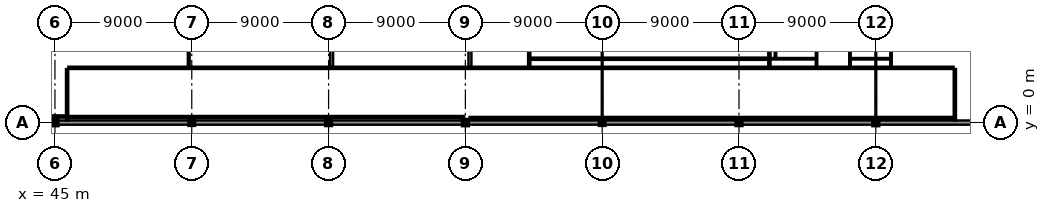
"""IFC4 building model, lengths in metres.
Left out: names, types, materials, properties, quantities, classifications, styles, units other than length and angle.
Written with IfcOpenShell. Run it as: python <this file> out.ifc"""

import sys

from ifc_helpers import new_model, si_unit, direction, frame, frame_2d, origin, origin_2d, place, context, subcontext, project, spatial, rectangle, i_section, extrude, element, fill, save


model = new_model("IFC4")
c1 = context("Model", 3, precision=1e-05, world=origin(), true_north=direction((0.0, 1.0)))
c2 = subcontext(c1, "Body", "Model", "MODEL_VIEW")
j1 = project(units=[si_unit("LENGTHUNIT", "METRE"), si_unit("PLANEANGLEUNIT", "RADIAN")], contexts=[c1])
p1 = place(None, origin())
s1 = spatial("IfcSite", under=j1, at=p1, CompositionType="ELEMENT")
p2 = place(p1, origin())
s2 = spatial("IfcBuilding", under=s1, at=p2, CompositionType="ELEMENT")
p3 = place(p2, frame((0.0, 0.0, 27.4)))
s3 = spatial("IfcBuildingStorey", under=s2, at=p3, CompositionType="ELEMENT", Elevation=27.4)
p4 = place(p3, frame((45.0, 0.0, 0.0), z_axis=(0.0, 0.0, 1.0), x_axis=(0.0, 1.0, 0.0)))
e1 = element("IfcColumn", 1, at=p4, inside=s3, PredefinedType="COLUMN", context=c2, shape_type="SweptSolid", body=[
    extrude(i_section(OverallWidth=0.3, OverallDepth=0.32, WebThickness=0.011, FlangeThickness=0.021, at=origin_2d()), origin(), (0.0, 0.0, 1.0), 4.0),
])
p5 = place(p3, frame((54.0, 0.0, 0.0), z_axis=(0.0, 0.0, 1.0), x_axis=(1.0, 0.0, 0.0)))
e2 = element("IfcColumn", 2, at=p5, inside=s3, PredefinedType="COLUMN", context=c2, shape_type="SweptSolid", body=[
    extrude(i_section(OverallWidth=0.28, OverallDepth=0.28, WebThickness=0.01, FlangeThickness=0.018, at=origin_2d()), origin(), (0.0, 0.0, 1.0), 4.0),
])
p6 = place(p3, frame((63.0, 0.0, 0.0), z_axis=(0.0, 0.0, 1.0), x_axis=(1.0, 0.0, 0.0)))
e3 = element("IfcColumn", 3, at=p6, inside=s3, PredefinedType="COLUMN", context=c2, shape_type="SweptSolid", body=[
    extrude(i_section(OverallWidth=0.3, OverallDepth=0.3, WebThickness=0.011, FlangeThickness=0.019, at=origin_2d()), origin(), (0.0, 0.0, 1.0), 4.0),
])
p7 = place(p3, frame((72.0, 0.0, 0.0), z_axis=(0.0, 0.0, 1.0), x_axis=(1.0, 0.0, 0.0)))
e4 = element("IfcColumn", 4, at=p7, inside=s3, PredefinedType="COLUMN", context=c2, shape_type="SweptSolid", body=[
    extrude(i_section(OverallWidth=0.3, OverallDepth=0.32, WebThickness=0.011, FlangeThickness=0.021, at=origin_2d()), origin(), (0.0, 0.0, 1.0), 4.0),
])
p8 = place(p3, frame((81.0, 0.0, 0.0), z_axis=(0.0, 0.0, 1.0), x_axis=(1.0, 0.0, 0.0)))
e5 = element("IfcColumn", 5, at=p8, inside=s3, PredefinedType="COLUMN", context=c2, shape_type="SweptSolid", body=[
    extrude(i_section(OverallWidth=0.28, OverallDepth=0.28, WebThickness=0.01, FlangeThickness=0.018, at=origin_2d()), origin(), (0.0, 0.0, 1.0), 4.0),
])
p9 = place(p3, frame((90.0, 0.0, 0.0), z_axis=(0.0, 0.0, 1.0), x_axis=(0.0, 1.0, 0.0)))
e6 = element("IfcColumn", 6, at=p9, inside=s3, PredefinedType="COLUMN", context=c2, shape_type="SweptSolid", body=[
    extrude(i_section(OverallWidth=0.3, OverallDepth=0.3, WebThickness=0.011, FlangeThickness=0.019, at=origin_2d()), origin(), (0.0, 0.0, 1.0), 4.0),
])
p10 = place(p3, frame((99.0, 0.0, 0.0), z_axis=(0.0, 0.0, 1.0), x_axis=(1.0, 0.0, 0.0)))
e7 = element("IfcColumn", 7, at=p10, inside=s3, PredefinedType="COLUMN", context=c2, shape_type="SweptSolid", body=[
    extrude(i_section(OverallWidth=0.3, OverallDepth=0.32, WebThickness=0.011, FlangeThickness=0.021, at=origin_2d()), origin(), (0.0, 0.0, 1.0), 4.0),
])
p11 = place(p3, frame((35.99, 0.0, 0.0), z_axis=(0.0, 0.0, 1.0), x_axis=(1.0, 0.0, 0.0)))
e8 = element("IfcWall", 8, at=p11, inside=s3, PredefinedType="SOLIDWALL", context=c2, shape_type="SweptSolid", body=[
    extrude(rectangle(XDim=8.852, YDim=0.28, at=frame_2d((4.426, 0.0))), origin(), (0.0, 0.0, 1.0), 2.787),
])
p12 = place(p3, frame((45.158, 0.0, 0.0), z_axis=(0.0, 0.0, 1.0), x_axis=(1.0, 0.0, 0.0)))
e9 = element("IfcWall", 9, at=p12, inside=s3, PredefinedType="SOLIDWALL", context=c2, shape_type="SweptSolid", body=[
    extrude(rectangle(XDim=8.834, YDim=0.28, at=frame_2d((4.417, 0.0))), origin(), (0.0, 0.0, 1.0), 2.787),
])
p13 = place(p12, frame((2.0, 0.0, 1.05)))
e10 = element("IfcOpeningElement", 10, at=p13, cuts=e9, PredefinedType="OPENING", context=c2, shape_type="SweptSolid", body=[
    extrude(rectangle(XDim=1.3, YDim=1.3, at=frame_2d((0.65, 0.65))), frame((0.0, 0.155, 0.0), z_axis=(0.0, -1.0, 0.0), x_axis=(1.0, 0.0, 0.0)), (0.0, 0.0, 1.0), 0.31),
])
p14 = place(p12, frame((5.534, 0.0, 1.05)))
e11 = element("IfcOpeningElement", 11, at=p14, cuts=e9, PredefinedType="OPENING", context=c2, shape_type="SweptSolid", body=[
    extrude(rectangle(XDim=1.3, YDim=1.3, at=frame_2d((0.65, 0.65))), frame((0.0, 0.155, 0.0), z_axis=(0.0, -1.0, 0.0), x_axis=(1.0, 0.0, 0.0)), (0.0, 0.0, 1.0), 0.31),
])
p15 = place(p3, frame((54.008, 0.0, 0.0), z_axis=(0.0, 0.0, 1.0), x_axis=(1.0, 0.0, 0.0)))
e12 = element("IfcWall", 12, at=p15, inside=s3, PredefinedType="SOLIDWALL", context=c2, shape_type="SweptSolid", body=[
    extrude(rectangle(XDim=8.984, YDim=0.28, at=frame_2d((4.492, 0.0))), origin(), (0.0, 0.0, 1.0), 2.787),
])
p16 = place(p15, frame((2.045, 0.0, 1.05)))
e13 = element("IfcOpeningElement", 13, at=p16, cuts=e12, PredefinedType="OPENING", context=c2, shape_type="SweptSolid", body=[
    extrude(rectangle(XDim=1.3, YDim=1.3, at=frame_2d((0.65, 0.65))), frame((0.0, 0.155, 0.0), z_axis=(0.0, -1.0, 0.0), x_axis=(1.0, 0.0, 0.0)), (0.0, 0.0, 1.0), 0.31),
])
p17 = place(p15, frame((5.639, 0.0, 1.05)))
e14 = element("IfcOpeningElement", 14, at=p17, cuts=e12, PredefinedType="OPENING", context=c2, shape_type="SweptSolid", body=[
    extrude(rectangle(XDim=1.3, YDim=1.3, at=frame_2d((0.65, 0.65))), frame((0.0, 0.155, 0.0), z_axis=(0.0, -1.0, 0.0), x_axis=(1.0, 0.0, 0.0)), (0.0, 0.0, 1.0), 0.31),
])
p18 = place(p3, frame((63.008, 0.0, 0.0), z_axis=(0.0, 0.0, 1.0), x_axis=(1.0, 0.0, 0.0)))
e15 = element("IfcWall", 15, at=p18, inside=s3, PredefinedType="SOLIDWALL", context=c2, shape_type="SweptSolid", body=[
    extrude(rectangle(XDim=8.984, YDim=0.28, at=frame_2d((4.492, 0.0))), origin(), (0.0, 0.0, 1.0), 2.787),
])
p19 = place(p18, frame((2.045, 0.0, 1.05)))
e16 = element("IfcOpeningElement", 16, at=p19, cuts=e15, PredefinedType="OPENING", context=c2, shape_type="SweptSolid", body=[
    extrude(rectangle(XDim=1.3, YDim=1.3, at=frame_2d((0.65, 0.65))), frame((0.0, 0.155, 0.0), z_axis=(0.0, -1.0, 0.0), x_axis=(1.0, 0.0, 0.0)), (0.0, 0.0, 1.0), 0.31),
])
p20 = place(p18, frame((5.639, 0.0, 1.05)))
e17 = element("IfcOpeningElement", 17, at=p20, cuts=e15, PredefinedType="OPENING", context=c2, shape_type="SweptSolid", body=[
    extrude(rectangle(XDim=1.3, YDim=1.3, at=frame_2d((0.65, 0.65))), frame((0.0, 0.155, 0.0), z_axis=(0.0, -1.0, 0.0), x_axis=(1.0, 0.0, 0.0)), (0.0, 0.0, 1.0), 0.31),
])
p21 = place(p3, frame((72.008, 0.0, 0.0), z_axis=(0.0, 0.0, 1.0), x_axis=(1.0, 0.0, 0.0)))
e18 = element("IfcWall", 18, at=p21, inside=s3, PredefinedType="SOLIDWALL", context=c2, shape_type="SweptSolid", body=[
    extrude(rectangle(XDim=8.934, YDim=0.28, at=frame_2d((4.467, 0.0))), origin(), (0.0, 0.0, 1.0), 2.885),
])
p22 = place(p21, frame((2.03, 0.0, 1.05)))
e19 = element("IfcOpeningElement", 19, at=p22, cuts=e18, PredefinedType="OPENING", context=c2, shape_type="SweptSolid", body=[
    extrude(rectangle(XDim=1.3, YDim=1.3, at=frame_2d((0.65, 0.65))), frame((0.0, 0.155, 0.0), z_axis=(0.0, -1.0, 0.0), x_axis=(1.0, 0.0, 0.0)), (0.0, 0.0, 1.0), 0.31),
])
p23 = place(p21, frame((5.604, 0.0, 1.05)))
e20 = element("IfcOpeningElement", 20, at=p23, cuts=e18, PredefinedType="OPENING", context=c2, shape_type="SweptSolid", body=[
    extrude(rectangle(XDim=1.3, YDim=1.3, at=frame_2d((0.65, 0.65))), frame((0.0, 0.155, 0.0), z_axis=(0.0, -1.0, 0.0), x_axis=(1.0, 0.0, 0.0)), (0.0, 0.0, 1.0), 0.31),
])
p24 = place(p3, frame((81.058, 0.0, 0.0), z_axis=(0.0, 0.0, 1.0), x_axis=(1.0, 0.0, 0.0)))
e21 = element("IfcWall", 21, at=p24, inside=s3, PredefinedType="SOLIDWALL", context=c2, shape_type="SweptSolid", body=[
    extrude(rectangle(XDim=8.794, YDim=0.28, at=frame_2d((4.397, 0.0))), origin(), (0.0, 0.0, 1.0), 2.885),
])
p25 = place(p24, frame((1.988, 0.0, 1.05)))
e22 = element("IfcOpeningElement", 22, at=p25, cuts=e21, PredefinedType="OPENING", context=c2, shape_type="SweptSolid", body=[
    extrude(rectangle(XDim=1.3, YDim=1.3, at=frame_2d((0.65, 0.65))), frame((0.0, 0.155, 0.0), z_axis=(0.0, -1.0, 0.0), x_axis=(1.0, 0.0, 0.0)), (0.0, 0.0, 1.0), 0.31),
])
p26 = place(p24, frame((5.506, 0.0, 1.05)))
e23 = element("IfcOpeningElement", 23, at=p26, cuts=e21, PredefinedType="OPENING", context=c2, shape_type="SweptSolid", body=[
    extrude(rectangle(XDim=1.3, YDim=1.3, at=frame_2d((0.65, 0.65))), frame((0.0, 0.155, 0.0), z_axis=(0.0, -1.0, 0.0), x_axis=(1.0, 0.0, 0.0)), (0.0, 0.0, 1.0), 0.31),
])
p27 = place(p3, frame((90.148, 0.0, 0.0), z_axis=(0.0, 0.0, 1.0), x_axis=(1.0, 0.0, 0.0)))
e24 = element("IfcWall", 24, at=p27, inside=s3, PredefinedType="SOLIDWALL", context=c2, shape_type="SweptSolid", body=[
    extrude(rectangle(XDim=8.794, YDim=0.28, at=frame_2d((4.397, 0.0))), origin(), (0.0, 0.0, 1.0), 2.885),
])
p28 = place(p27, frame((1.988, 0.0, 1.05)))
e25 = element("IfcOpeningElement", 25, at=p28, cuts=e24, PredefinedType="OPENING", context=c2, shape_type="SweptSolid", body=[
    extrude(rectangle(XDim=1.3, YDim=1.3, at=frame_2d((0.65, 0.65))), frame((0.0, 0.155, 0.0), z_axis=(0.0, -1.0, 0.0), x_axis=(1.0, 0.0, 0.0)), (0.0, 0.0, 1.0), 0.31),
])
p29 = place(p27, frame((5.506, 0.0, 1.05)))
e26 = element("IfcOpeningElement", 26, at=p29, cuts=e24, PredefinedType="OPENING", context=c2, shape_type="SweptSolid", body=[
    extrude(rectangle(XDim=1.3, YDim=1.3, at=frame_2d((0.65, 0.65))), frame((0.0, 0.155, 0.0), z_axis=(0.0, -1.0, 0.0), x_axis=(1.0, 0.0, 0.0)), (0.0, 0.0, 1.0), 0.31),
])
p30 = place(p3, frame((99.058, 0.0, 0.0), z_axis=(0.0, 0.0, 1.0), x_axis=(1.0, 0.0, 0.0)))
e27 = element("IfcWall", 27, at=p30, inside=s3, PredefinedType="SOLIDWALL", context=c2, shape_type="SweptSolid", body=[
    extrude(rectangle(XDim=8.934, YDim=0.28, at=frame_2d((4.467, 0.0))), origin(), (0.0, 0.0, 1.0), 2.885),
])
p31 = place(p30, frame((2.03, 0.0, 1.05)))
e28 = element("IfcOpeningElement", 28, at=p31, cuts=e27, PredefinedType="OPENING", context=c2, shape_type="SweptSolid", body=[
    extrude(rectangle(XDim=1.3, YDim=1.3, at=frame_2d((0.65, 0.65))), frame((0.0, 0.155, 0.0), z_axis=(0.0, -1.0, 0.0), x_axis=(1.0, 0.0, 0.0)), (0.0, 0.0, 1.0), 0.31),
])
p32 = place(p30, frame((5.604, 0.0, 1.05)))
e29 = element("IfcOpeningElement", 29, at=p32, cuts=e27, PredefinedType="OPENING", context=c2, shape_type="SweptSolid", body=[
    extrude(rectangle(XDim=1.3, YDim=1.3, at=frame_2d((0.65, 0.65))), frame((0.0, 0.155, 0.0), z_axis=(0.0, -1.0, 0.0), x_axis=(1.0, 0.0, 0.0)), (0.0, 0.0, 1.0), 0.31),
])
p33 = place(p3, frame((71.92, 0.36, 0.0), z_axis=(0.0, 0.0, 1.0), x_axis=(-1.0, 0.0, 0.0)))
e30 = element("IfcWall", 30, at=p33, inside=s3, PredefinedType="PARTITIONING", context=c2, shape_type="SweptSolid", body=[
    extrude(rectangle(XDim=26.04, YDim=0.15, at=frame_2d((13.02, 0.0))), origin(), (0.0, 0.0, 1.0), 3.64),
])
p34 = place(p3, frame((45.8, 0.135, 0.0), z_axis=(0.0, 0.0, 1.0), x_axis=(0.0, 1.0, 0.0)))
e31 = element("IfcWall", 31, at=p34, inside=s3, PredefinedType="PARTITIONING", context=c2, shape_type="SweptSolid", body=[
    extrude(rectangle(XDim=3.385, YDim=0.15, at=frame_2d((1.692, 0.0))), origin(), (0.0, 0.0, 1.0), 3.64),
])
p35 = place(p3, frame((45.88, 3.6, 0.0), z_axis=(0.0, 0.0, 1.0), x_axis=(1.0, 0.0, 0.0)))
e32 = element("IfcWall", 32, at=p35, inside=s3, PredefinedType="PARTITIONING", context=c2, shape_type="SweptSolid", body=[
    extrude(rectangle(XDim=58.24, YDim=0.15, at=frame_2d((29.12, 0.0))), origin(), (0.0, 0.0, 1.0), 3.64),
])
p36 = place(p35, frame((27.795, 0.0, 0.0)))
e33 = element("IfcOpeningElement", 33, at=p36, cuts=e32, PredefinedType="OPENING", context=c2, shape_type="SweptSolid", body=[
    extrude(rectangle(XDim=1.05, YDim=2.25, at=frame_2d((0.525, 1.125))), frame((0.0, 0.09, 0.0), z_axis=(0.0, -1.0, 0.0), x_axis=(1.0, 0.0, 0.0)), (0.0, 0.0, 1.0), 0.18),
])
p37 = place(p3, frame((104.2, 3.52, 0.0), z_axis=(0.0, 0.0, 1.0), x_axis=(0.0, -1.0, 0.0)))
e34 = element("IfcWall", 34, at=p37, inside=s3, PredefinedType="PARTITIONING", context=c2, shape_type="SweptSolid", body=[
    extrude(rectangle(XDim=3.385, YDim=0.15, at=frame_2d((1.692, 0.0))), origin(), (0.0, 0.0, 1.0), 3.64),
])
p38 = place(p3, frame((104.13, 0.3, 0.0), z_axis=(0.0, 0.0, 1.0), x_axis=(-1.0, 0.0, 0.0)))
e35 = element("IfcWall", 35, at=p38, inside=s3, PredefinedType="PARTITIONING", context=c2, shape_type="SweptSolid", body=[
    extrude(rectangle(XDim=31.851, YDim=0.15, at=frame_2d((15.925, 0.0))), origin(), (0.0, 0.0, 1.0), 3.64),
])
p39 = place(p3, frame((53.8, 12.62, 0.0), z_axis=(0.0, 0.0, 1.0), x_axis=(0.0, -1.0, 0.0)))
e36 = element("IfcWall", 36, at=p39, inside=s3, PredefinedType="PARTITIONING", context=c2, shape_type="SweptSolid", body=[
    extrude(rectangle(XDim=8.95, YDim=0.12, at=frame_2d((4.475, 0.0))), origin(), (0.0, 0.0, 1.0), 3.405),
])
p40 = place(p3, frame((45.73, 0.4, 0.0), z_axis=(0.0, 0.0, 1.0), x_axis=(-1.0, 0.0, 0.0)))
e37 = element("IfcWall", 37, at=p40, inside=s3, PredefinedType="PARTITIONING", context=c2, shape_type="SweptSolid", body=[
    extrude(rectangle(XDim=13.195, YDim=0.15, at=frame_2d((6.598, 0.0))), origin(), (0.0, 0.0, 1.0), 3.64),
])
p41 = place(p3, frame((72.3, 11.42, 0.0), z_axis=(0.0, 0.0, 1.0), x_axis=(0.0, -1.0, 0.0)))
e38 = element("IfcWall", 38, at=p41, inside=s3, PredefinedType="PARTITIONING", context=c2, shape_type="SweptSolid", body=[
    extrude(rectangle(XDim=7.75, YDim=0.2, at=frame_2d((3.875, 0.0))), origin(), (0.0, 0.0, 1.0), 3.64),
])
p42 = place(p41, frame((3.025, 0.0, 0.0)))
e39 = element("IfcOpeningElement", 39, at=p42, cuts=e38, PredefinedType="OPENING", context=c2, shape_type="SweptSolid", body=[
    extrude(rectangle(XDim=1.7, YDim=2.4, at=frame_2d((0.85, 1.2))), frame((0.0, 0.115, 0.0), z_axis=(0.0, -1.0, 0.0), x_axis=(1.0, 0.0, 0.0)), (0.0, 0.0, 1.0), 0.23),
])
p43 = place(p3, frame((63.2, 3.67, 0.0), z_axis=(0.0, 0.0, 1.0), x_axis=(0.0, 1.0, 0.0)))
e40 = element("IfcWall", 40, at=p43, inside=s3, PredefinedType="PARTITIONING", context=c2, shape_type="SweptSolid", body=[
    extrude(rectangle(XDim=7.75, YDim=0.2, at=frame_2d((3.875, 0.0))), origin(), (0.0, 0.0, 1.0), 3.355),
])
for number, where, z_axis, x_axis in (
    (41, (76.2, 3.67, 0.0), (0.0, 0.0, 1.0), (0.0, 1.0, 0.0)),
    (42, (92.0, 15.32, 0.0), (0.0, 0.0, 1.0), (0.0, -1.0, 0.0)),
):
    element("IfcWall", number, at=place(p3, frame(where, z_axis=z_axis, x_axis=x_axis)), inside=s3, PredefinedType="PARTITIONING", context=c2, shape_type="SweptSolid", body=[
        extrude(rectangle(XDim=11.65, YDim=0.15, at=frame_2d((5.825, 0.0))), origin(), (0.0, 0.0, 1.0), 3.64),
    ])
p44 = place(p3, frame((91.93, 4.2, 0.0), z_axis=(0.0, 0.0, 1.0), x_axis=(-1.0, 0.0, 0.0)))
e43 = element("IfcWall", 43, at=p44, inside=s3, PredefinedType="PARTITIONING", context=c2, shape_type="SweptSolid", body=[
    extrude(rectangle(XDim=15.66, YDim=0.15, at=frame_2d((7.83, 0.0))), origin(), (0.0, 0.0, 1.0), 3.64),
])
p45 = place(p3, frame((95.1, 9.72, 0.0), z_axis=(0.0, 0.0, 1.0), x_axis=(0.0, -1.0, 0.0)))
e44 = element("IfcWall", 44, at=p45, inside=s3, PredefinedType="PARTITIONING", context=c2, shape_type="SweptSolid", body=[
    extrude(rectangle(XDim=6.05, YDim=0.1, at=frame_2d((3.025, 0.0))), origin(), (0.0, 0.0, 1.0), 3.64),
])
p46 = place(p45, frame((2.529, 0.0, 0.0)))
e45 = element("IfcOpeningElement", 45, at=p46, cuts=e44, PredefinedType="OPENING", context=c2, shape_type="SweptSolid", body=[
    extrude(rectangle(XDim=0.9, YDim=2.05, at=frame_2d((0.45, 1.025))), frame((0.0, 0.065, 0.0), z_axis=(0.0, -1.0, 0.0), x_axis=(1.0, 0.0, 0.0)), (0.0, 0.0, 1.0), 0.13),
])
p47 = place(p3, frame((95.055, 4.2, 0.0), z_axis=(0.0, 0.0, 1.0), x_axis=(-1.0, 0.0, 0.0)))
e46 = element("IfcWall", 46, at=p47, inside=s3, PredefinedType="PARTITIONING", context=c2, shape_type="SweptSolid", body=[
    extrude(rectangle(XDim=2.985, YDim=0.1, at=frame_2d((1.492, 0.0))), origin(), (0.0, 0.0, 1.0), 3.64),
])
p48 = place(p3, frame((92.4, 4.245, 0.0), z_axis=(0.0, 0.0, 1.0), x_axis=(0.0, 1.0, 0.0)))
e47 = element("IfcWall", 47, at=p48, inside=s3, PredefinedType="PARTITIONING", context=c2, shape_type="SweptSolid", body=[
    extrude(rectangle(XDim=5.475, YDim=0.1, at=frame_2d((2.737, 0.0))), origin(), (0.0, 0.0, 1.0), 3.64),
])
p49 = place(p3, frame((100.0, 9.62, 0.0), z_axis=(0.0, 0.0, 1.0), x_axis=(0.0, -1.0, 0.0)))
e48 = element("IfcWall", 48, at=p49, inside=s3, PredefinedType="PARTITIONING", context=c2, shape_type="SweptSolid", body=[
    extrude(rectangle(XDim=5.95, YDim=0.1, at=frame_2d((2.975, 0.0))), origin(), (0.0, 0.0, 1.0), 3.64),
])
p50 = place(p3, frame((99.955, 4.2, 0.0), z_axis=(0.0, 0.0, 1.0), x_axis=(-1.0, 0.0, 0.0)))
e49 = element("IfcWall", 49, at=p50, inside=s3, PredefinedType="PARTITIONING", context=c2, shape_type="SweptSolid", body=[
    extrude(rectangle(XDim=2.575, YDim=0.1, at=frame_2d((1.288, 0.0))), origin(), (0.0, 0.0, 1.0), 3.64),
])
p51 = place(p3, frame((97.3, 3.67, 0.0), z_axis=(0.0, 0.0, 1.0), x_axis=(0.0, 1.0, 0.0)))
e50 = element("IfcWall", 50, at=p51, inside=s3, PredefinedType="PARTITIONING", context=c2, shape_type="SweptSolid", body=[
    extrude(rectangle(XDim=5.95, YDim=0.1, at=frame_2d((2.975, 0.0))), origin(), (0.0, 0.0, 1.0), 3.64),
])
p52 = place(p51, frame((2.571, 0.0, 0.0)))
e51 = element("IfcOpeningElement", 51, at=p52, cuts=e50, PredefinedType="OPENING", context=c2, shape_type="SweptSolid", body=[
    extrude(rectangle(XDim=0.9, YDim=2.05, at=frame_2d((0.45, 1.025))), frame((0.0, 0.065, 0.0), z_axis=(0.0, -1.0, 0.0), x_axis=(1.0, 0.0, 0.0)), (0.0, 0.0, 1.0), 0.13),
])
p53 = place(p13, origin())
e52 = element("IfcWindow", 52, at=p53, inside=s3, PartitioningType="SINGLE_PANEL", PredefinedType="WINDOW", context=c2, shape_type="SweptSolid", body=[
    extrude(rectangle(XDim=1.3, YDim=1.3, at=frame_2d((0.65, 0.65))), frame((0.0, 0.03, 0.0), z_axis=(0.0, -1.0, 0.0), x_axis=(1.0, 0.0, 0.0)), (0.0, 0.0, 1.0), 0.06),
])
fill(e10, e52)
p54 = place(p14, origin())
e53 = element("IfcWindow", 53, at=p54, inside=s3, PartitioningType="SINGLE_PANEL", PredefinedType="WINDOW", context=c2, shape_type="SweptSolid", body=[
    extrude(rectangle(XDim=1.3, YDim=1.3, at=frame_2d((0.65, 0.65))), frame((0.0, 0.03, 0.0), z_axis=(0.0, -1.0, 0.0), x_axis=(1.0, 0.0, 0.0)), (0.0, 0.0, 1.0), 0.06),
])
fill(e11, e53)
p55 = place(p16, origin())
e54 = element("IfcWindow", 54, at=p55, inside=s3, PartitioningType="SINGLE_PANEL", PredefinedType="WINDOW", context=c2, shape_type="SweptSolid", body=[
    extrude(rectangle(XDim=1.3, YDim=1.3, at=frame_2d((0.65, 0.65))), frame((0.0, 0.03, 0.0), z_axis=(0.0, -1.0, 0.0), x_axis=(1.0, 0.0, 0.0)), (0.0, 0.0, 1.0), 0.06),
])
fill(e13, e54)
p56 = place(p17, origin())
e55 = element("IfcWindow", 55, at=p56, inside=s3, PartitioningType="SINGLE_PANEL", PredefinedType="WINDOW", context=c2, shape_type="SweptSolid", body=[
    extrude(rectangle(XDim=1.3, YDim=1.3, at=frame_2d((0.65, 0.65))), frame((0.0, 0.03, 0.0), z_axis=(0.0, -1.0, 0.0), x_axis=(1.0, 0.0, 0.0)), (0.0, 0.0, 1.0), 0.06),
])
fill(e14, e55)
p57 = place(p19, origin())
e56 = element("IfcWindow", 56, at=p57, inside=s3, PartitioningType="SINGLE_PANEL", PredefinedType="WINDOW", context=c2, shape_type="SweptSolid", body=[
    extrude(rectangle(XDim=1.3, YDim=1.3, at=frame_2d((0.65, 0.65))), frame((0.0, 0.03, 0.0), z_axis=(0.0, -1.0, 0.0), x_axis=(1.0, 0.0, 0.0)), (0.0, 0.0, 1.0), 0.06),
])
fill(e16, e56)
p58 = place(p20, origin())
e57 = element("IfcWindow", 57, at=p58, inside=s3, PartitioningType="SINGLE_PANEL", PredefinedType="WINDOW", context=c2, shape_type="SweptSolid", body=[
    extrude(rectangle(XDim=1.3, YDim=1.3, at=frame_2d((0.65, 0.65))), frame((0.0, 0.03, 0.0), z_axis=(0.0, -1.0, 0.0), x_axis=(1.0, 0.0, 0.0)), (0.0, 0.0, 1.0), 0.06),
])
fill(e17, e57)
p59 = place(p22, origin())
e58 = element("IfcWindow", 58, at=p59, inside=s3, PartitioningType="SINGLE_PANEL", PredefinedType="WINDOW", context=c2, shape_type="SweptSolid", body=[
    extrude(rectangle(XDim=1.3, YDim=1.3, at=frame_2d((0.65, 0.65))), frame((0.0, 0.03, 0.0), z_axis=(0.0, -1.0, 0.0), x_axis=(1.0, 0.0, 0.0)), (0.0, 0.0, 1.0), 0.06),
])
fill(e19, e58)
p60 = place(p23, origin())
e59 = element("IfcWindow", 59, at=p60, inside=s3, PartitioningType="SINGLE_PANEL", PredefinedType="WINDOW", context=c2, shape_type="SweptSolid", body=[
    extrude(rectangle(XDim=1.3, YDim=1.3, at=frame_2d((0.65, 0.65))), frame((0.0, 0.03, 0.0), z_axis=(0.0, -1.0, 0.0), x_axis=(1.0, 0.0, 0.0)), (0.0, 0.0, 1.0), 0.06),
])
fill(e20, e59)
p61 = place(p25, origin())
e60 = element("IfcWindow", 60, at=p61, inside=s3, PartitioningType="SINGLE_PANEL", PredefinedType="WINDOW", context=c2, shape_type="SweptSolid", body=[
    extrude(rectangle(XDim=1.3, YDim=1.3, at=frame_2d((0.65, 0.65))), frame((0.0, 0.03, 0.0), z_axis=(0.0, -1.0, 0.0), x_axis=(1.0, 0.0, 0.0)), (0.0, 0.0, 1.0), 0.06),
])
fill(e22, e60)
p62 = place(p26, origin())
e61 = element("IfcWindow", 61, at=p62, inside=s3, PartitioningType="SINGLE_PANEL", PredefinedType="WINDOW", context=c2, shape_type="SweptSolid", body=[
    extrude(rectangle(XDim=1.3, YDim=1.3, at=frame_2d((0.65, 0.65))), frame((0.0, 0.03, 0.0), z_axis=(0.0, -1.0, 0.0), x_axis=(1.0, 0.0, 0.0)), (0.0, 0.0, 1.0), 0.06),
])
fill(e23, e61)
p63 = place(p28, origin())
e62 = element("IfcWindow", 62, at=p63, inside=s3, PartitioningType="SINGLE_PANEL", PredefinedType="WINDOW", context=c2, shape_type="SweptSolid", body=[
    extrude(rectangle(XDim=1.3, YDim=1.3, at=frame_2d((0.65, 0.65))), frame((0.0, 0.03, 0.0), z_axis=(0.0, -1.0, 0.0), x_axis=(1.0, 0.0, 0.0)), (0.0, 0.0, 1.0), 0.06),
])
fill(e25, e62)
p64 = place(p29, origin())
e63 = element("IfcWindow", 63, at=p64, inside=s3, PartitioningType="SINGLE_PANEL", PredefinedType="WINDOW", context=c2, shape_type="SweptSolid", body=[
    extrude(rectangle(XDim=1.3, YDim=1.3, at=frame_2d((0.65, 0.65))), frame((0.0, 0.03, 0.0), z_axis=(0.0, -1.0, 0.0), x_axis=(1.0, 0.0, 0.0)), (0.0, 0.0, 1.0), 0.06),
])
fill(e26, e63)
p65 = place(p31, origin())
e64 = element("IfcWindow", 64, at=p65, inside=s3, PartitioningType="SINGLE_PANEL", PredefinedType="WINDOW", context=c2, shape_type="SweptSolid", body=[
    extrude(rectangle(XDim=1.3, YDim=1.3, at=frame_2d((0.65, 0.65))), frame((0.0, 0.03, 0.0), z_axis=(0.0, -1.0, 0.0), x_axis=(1.0, 0.0, 0.0)), (0.0, 0.0, 1.0), 0.06),
])
fill(e28, e64)
p66 = place(p32, origin())
e65 = element("IfcWindow", 65, at=p66, inside=s3, PartitioningType="SINGLE_PANEL", PredefinedType="WINDOW", context=c2, shape_type="SweptSolid", body=[
    extrude(rectangle(XDim=1.3, YDim=1.3, at=frame_2d((0.65, 0.65))), frame((0.0, 0.03, 0.0), z_axis=(0.0, -1.0, 0.0), x_axis=(1.0, 0.0, 0.0)), (0.0, 0.0, 1.0), 0.06),
])
fill(e29, e65)
p67 = place(p36, frame((1.05, 0.0, 0.0), z_axis=(0.0, 0.0, 1.0), x_axis=(-1.0, 0.0, 0.0)))
e66 = element("IfcDoor", 66, at=p67, inside=s3, OperationType="SINGLE_SWING_LEFT", PredefinedType="DOOR", context=c2, shape_type="SweptSolid", body=[
    extrude(rectangle(XDim=1.05, YDim=2.25, at=frame_2d((0.525, 1.125))), frame((0.0, 0.025, 0.0), z_axis=(0.0, -1.0, 0.0), x_axis=(1.0, 0.0, 0.0)), (0.0, 0.0, 1.0), 0.05),
])
fill(e33, e66)
save(model, sys.argv[1])
